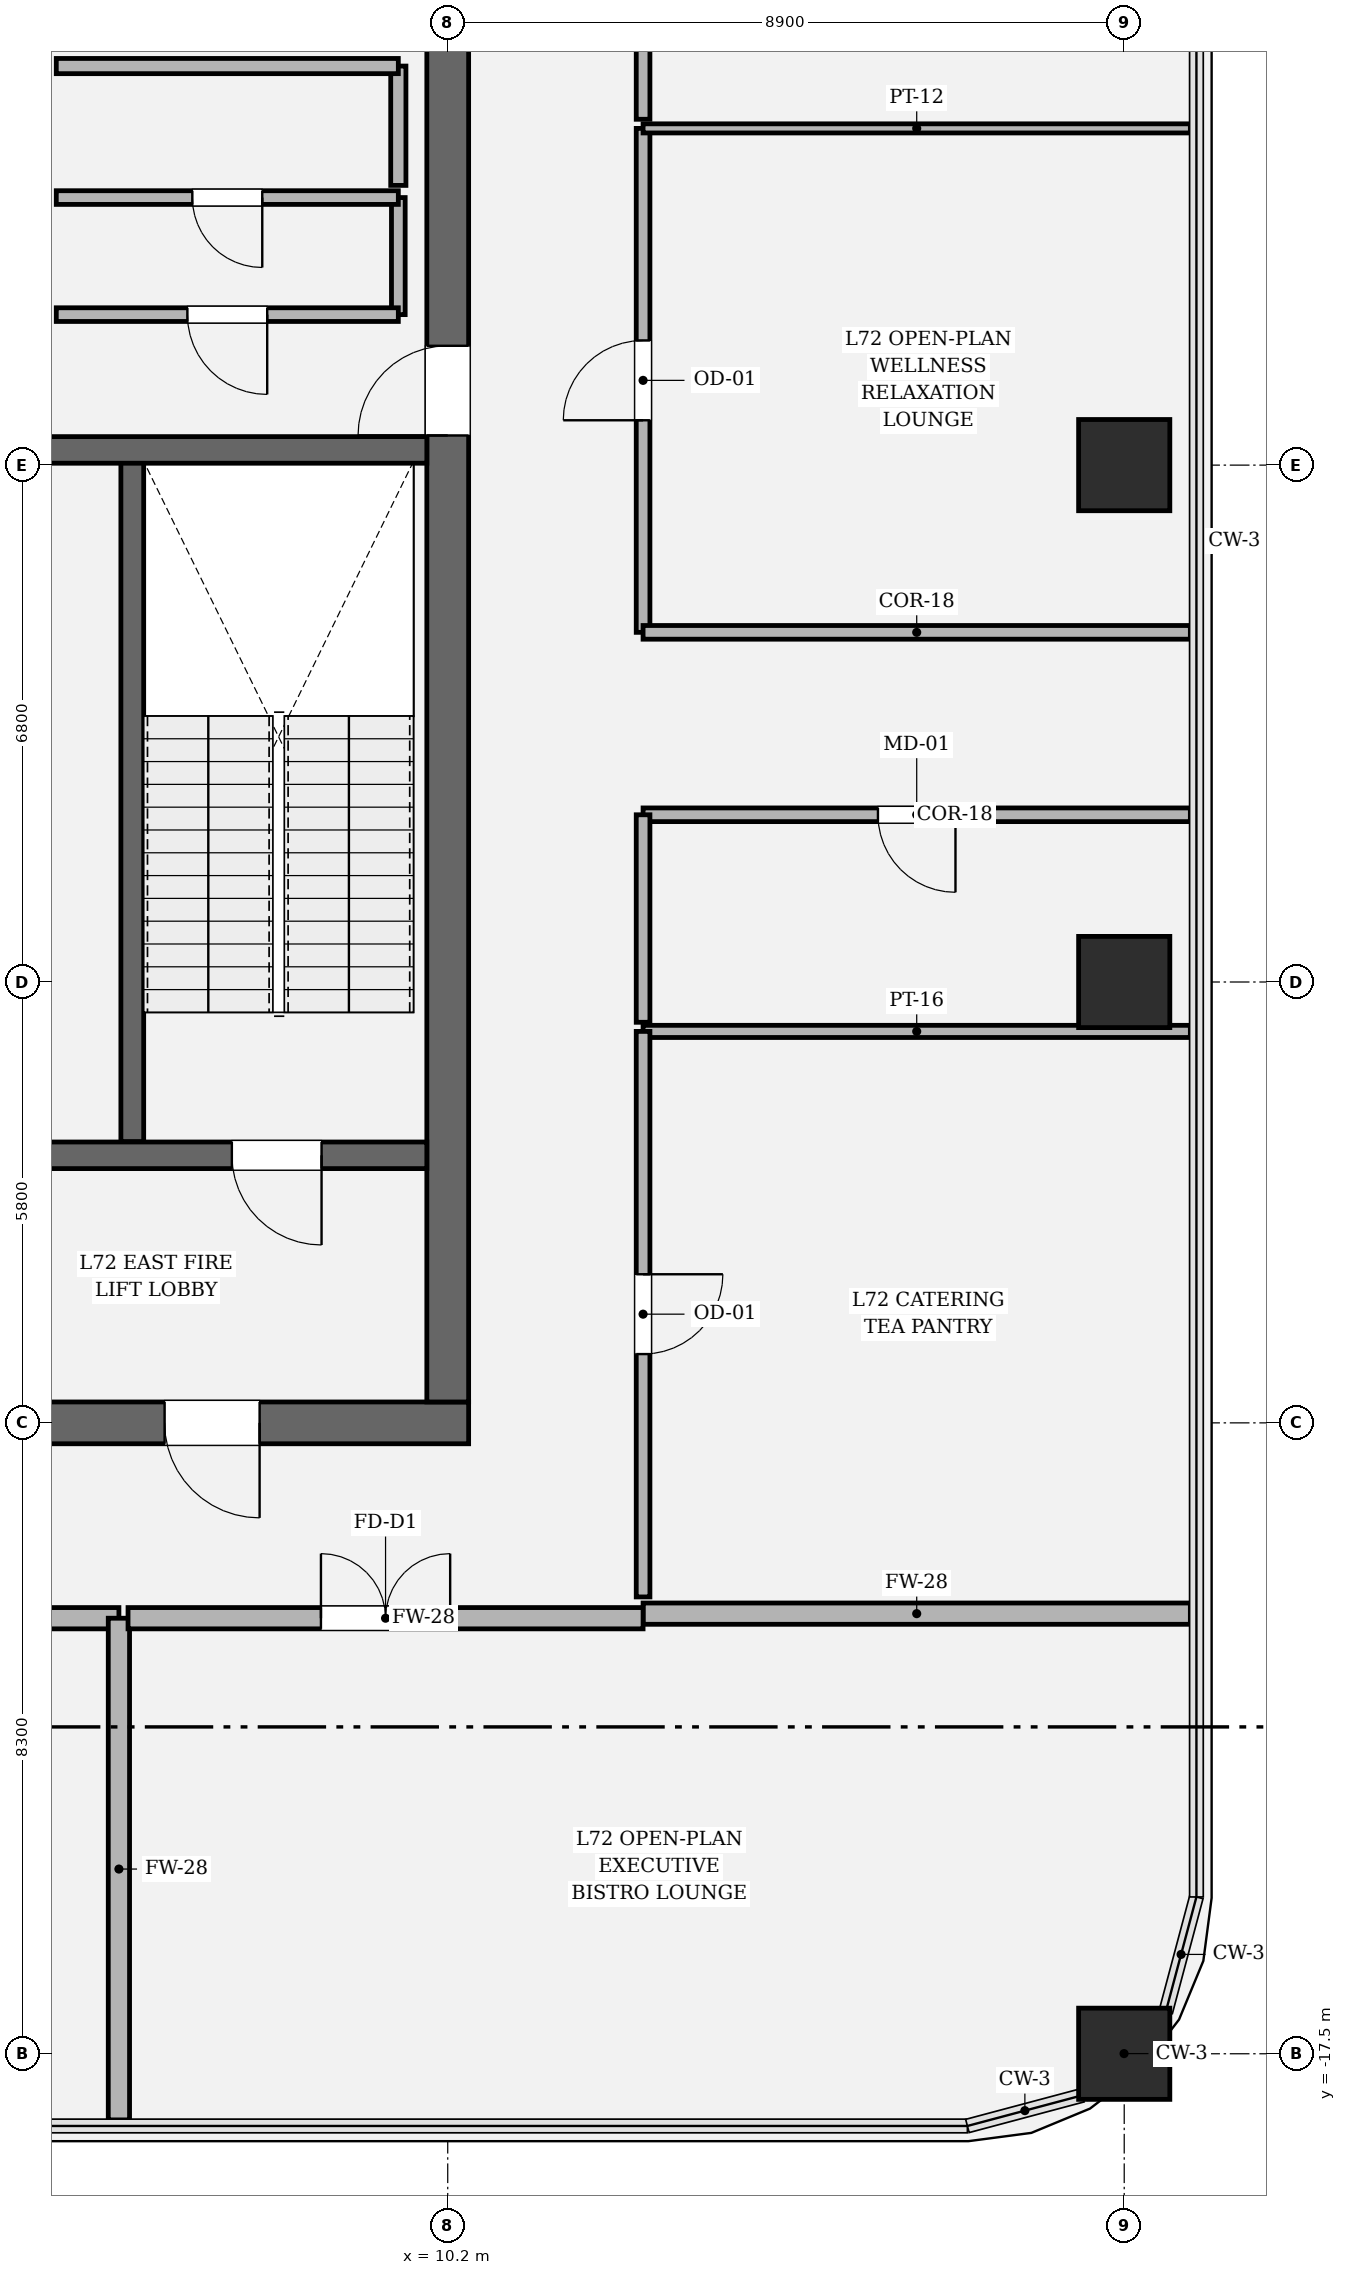
"""IFC4 building model, lengths in metres.
Left out: names, types, materials, properties, quantities, classifications, styles, units other than length and angle.
Written with IfcOpenShell. Run it as: python <this file> out.ifc"""

import sys

from ifc_helpers import new_model, si_unit, direction, frame, frame_2d, origin, origin_2d, place, context, subcontext, project, spatial, rectangle, hollow_rectangle, extrude, element, fill, save


model = new_model("IFC4")
c1 = context("Model", 3, precision=1e-05, world=origin(), true_north=direction((0.0, 1.0)))
c2 = subcontext(c1, "Body", "Model", "MODEL_VIEW")
j1 = project(units=[si_unit("LENGTHUNIT", "METRE"), si_unit("PLANEANGLEUNIT", "RADIAN")], contexts=[c1])
p1 = place(None, origin())
s1 = spatial("IfcSite", under=j1, at=p1, CompositionType="ELEMENT")
p2 = place(p1, origin())
s2 = spatial("IfcBuilding", under=s1, at=p2, CompositionType="ELEMENT")
p3 = place(p2, frame((0.0, 0.0, 304.8)))
s3 = spatial("IfcBuildingStorey", under=s2, at=p3, CompositionType="ELEMENT", Elevation=304.8)
p4 = place(p3, frame((10.475, -9.2, 0.0), z_axis=(0.0, 0.0, 1.0), x_axis=(-1.0, 0.0, 0.0)))
e1 = element("IfcWall", 1, at=p4, inside=s3, PredefinedType="SHEAR", context=c2, shape_type="SweptSolid", body=[
    extrude(rectangle(XDim=20.95, YDim=0.55, at=frame_2d((10.475, 0.0))), origin(), (0.0, 0.0, 1.0), 4.2),
])
p5 = place(p4, frame((2.75, 0.0, 0.0)))
e2 = element("IfcOpeningElement", 2, at=p5, cuts=e1, PredefinedType="OPENING", context=c2, shape_type="SweptSolid", body=[
    extrude(rectangle(XDim=1.25, YDim=2.25, at=frame_2d((0.625, 1.125))), frame((0.0, 0.285, 0.0), z_axis=(0.0, -1.0, 0.0), x_axis=(1.0, 0.0, 0.0)), (0.0, 0.0, 1.0), 0.57),
])
p6 = place(p4, frame((16.95, 0.0, 0.0)))
e3 = element("IfcOpeningElement", 3, at=p6, cuts=e1, PredefinedType="OPENING", context=c2, shape_type="SweptSolid", body=[
    extrude(rectangle(XDim=1.25, YDim=2.25, at=frame_2d((0.625, 1.125))), frame((0.0, 0.285, 0.0), z_axis=(0.0, -1.0, 0.0), x_axis=(1.0, 0.0, 0.0)), (0.0, 0.0, 1.0), 0.57),
])
p7 = place(p3, frame((10.2, 8.925, 0.0), z_axis=(0.0, 0.0, 1.0), x_axis=(0.0, -1.0, 0.0)))
e4 = element("IfcWall", 4, at=p7, inside=s3, PredefinedType="SHEAR", context=c2, shape_type="SweptSolid", body=[
    extrude(rectangle(XDim=17.85, YDim=0.55, at=frame_2d((8.925, 0.0))), origin(), (0.0, 0.0, 1.0), 4.2),
])
p8 = place(p7, frame((3.955, 0.0, 0.0)))
e5 = element("IfcOpeningElement", 5, at=p8, cuts=e4, PredefinedType="OPENING", context=c2, shape_type="SweptSolid", body=[
    extrude(rectangle(XDim=1.18, YDim=2.2, at=frame_2d((0.59, 1.1))), frame((0.0, 0.285, 0.0), z_axis=(0.0, -1.0, 0.0), x_axis=(1.0, 0.0, 0.0)), (0.0, 0.0, 1.0), 0.57),
])
p9 = place(p3, frame((6.05, 3.45, 0.0), z_axis=(0.0, 0.0, 1.0), x_axis=(0.0, -1.0, 0.0)))
e6 = element("IfcWall", 6, at=p9, inside=s3, PredefinedType="SOLIDWALL", context=c2, shape_type="SweptSolid", body=[
    extrude(rectangle(XDim=8.95, YDim=0.3, at=frame_2d((4.475, 0.0))), origin(), (0.0, 0.0, 1.0), 4.2),
])
p10 = place(p3, frame((4.65, -5.68, 0.0), z_axis=(0.0, 0.0, 1.0), x_axis=(1.0, 0.0, 0.0)))
e7 = element("IfcWall", 7, at=p10, inside=s3, PredefinedType="SOLIDWALL", context=c2, shape_type="SweptSolid", body=[
    extrude(rectangle(XDim=5.275, YDim=0.35, at=frame_2d((2.638, 0.0))), origin(), (0.0, 0.0, 1.0), 4.2),
])
p11 = place(p10, frame((2.71, 0.0, 0.0)))
e8 = element("IfcOpeningElement", 8, at=p11, cuts=e7, PredefinedType="OPENING", context=c2, shape_type="SweptSolid", body=[
    extrude(rectangle(XDim=1.18, YDim=2.2, at=frame_2d((0.59, 1.1))), frame((0.0, 0.185, 0.0), z_axis=(0.0, -1.0, 0.0), x_axis=(1.0, 0.0, 0.0)), (0.0, 0.0, 1.0), 0.37),
])
p12 = place(p3, frame((4.65, 3.6, 0.0), z_axis=(0.0, 0.0, 1.0), x_axis=(1.0, 0.0, 0.0)))
e9 = element("IfcWall", 9, at=p12, inside=s3, PredefinedType="SOLIDWALL", context=c2, shape_type="SweptSolid", body=[
    extrude(rectangle(XDim=5.275, YDim=0.35, at=frame_2d((2.638, 0.0))), origin(), (0.0, 0.0, 1.0), 4.2),
])
for number, where, z_axis, x_axis in (
    (10, (19.1, -17.5, 0.0), (0.0, 0.0, 1.0), (1.0, 0.0, 0.0)),
    (11, (19.1, -3.4, 0.0), (0.0, 0.0, 1.0), (1.0, 0.0, 0.0)),
    (12, (19.1, 3.4, 0.0), (0.0, 0.0, 1.0), (1.0, 0.0, 0.0)),
):
    element("IfcColumn", number, at=place(p3, frame(where, z_axis=z_axis, x_axis=x_axis)), inside=s3, PredefinedType="COLUMN", context=c2, shape_type="SweptSolid", body=[
        extrude(hollow_rectangle(XDim=1.2, YDim=1.2, WallThickness=0.035, at=origin_2d()), origin(), (0.0, 0.0, 1.0), 4.2),
    ])
p13 = place(p3, frame((9.55, 5.38, 0.0), z_axis=(0.0, 0.0, 1.0), x_axis=(0.0, 1.0, 0.0)))
e13 = element("IfcWall", 13, at=p13, inside=s3, PredefinedType="PARTITIONING", context=c2, shape_type="SweptSolid", body=[
    extrude(rectangle(XDim=1.54, YDim=0.18, at=frame_2d((0.77, 0.0))), origin(), (0.0, 0.0, 1.0), 4.0),
])
p14 = place(p3, frame((9.55, 6.92, 0.0), z_axis=(0.0, 0.0, 1.0), x_axis=(-1.0, 0.0, 0.0)))
e14 = element("IfcWall", 14, at=p14, inside=s3, PredefinedType="PARTITIONING", context=c2, shape_type="SweptSolid", body=[
    extrude(rectangle(XDim=4.5, YDim=0.18, at=frame_2d((2.25, 0.0))), origin(), (0.0, 0.0, 1.0), 4.0),
])
p15 = place(p14, frame((1.79, 0.0, 0.0)))
e15 = element("IfcOpeningElement", 15, at=p15, cuts=e14, PredefinedType="OPENING", context=c2, shape_type="SweptSolid", body=[
    extrude(rectangle(XDim=0.92, YDim=2.1, at=frame_2d((0.46, 1.05))), frame((0.0, 0.1, 0.0), z_axis=(0.0, -1.0, 0.0), x_axis=(1.0, 0.0, 0.0)), (0.0, 0.0, 1.0), 0.2),
])
p16 = place(p3, frame((5.05, 5.38, 0.0), z_axis=(0.0, 0.0, 1.0), x_axis=(1.0, 0.0, 0.0)))
e16 = element("IfcWall", 16, at=p16, inside=s3, PredefinedType="PARTITIONING", context=c2, shape_type="SweptSolid", body=[
    extrude(rectangle(XDim=4.5, YDim=0.18, at=frame_2d((2.25, 0.0))), origin(), (0.0, 0.0, 1.0), 4.0),
])
p17 = place(p16, frame((1.725, 0.0, 0.0)))
e17 = element("IfcOpeningElement", 17, at=p17, cuts=e16, PredefinedType="OPENING", context=c2, shape_type="SweptSolid", body=[
    extrude(rectangle(XDim=1.05, YDim=2.2, at=frame_2d((0.525, 1.1))), frame((0.0, 0.1, 0.0), z_axis=(0.0, -1.0, 0.0), x_axis=(1.0, 0.0, 0.0)), (0.0, 0.0, 1.0), 0.2),
])
p18 = place(p3, frame((9.55, 7.08, 0.0), z_axis=(0.0, 0.0, 1.0), x_axis=(0.0, 1.0, 0.0)))
e18 = element("IfcWall", 18, at=p18, inside=s3, PredefinedType="SOLIDWALL", context=c2, shape_type="SweptSolid", body=[
    extrude(rectangle(XDim=1.57, YDim=0.2, at=frame_2d((0.785, 0.0))), origin(), (0.0, 0.0, 1.0), 4.0),
])
p19 = place(p3, frame((9.55, 8.65, 0.0), z_axis=(0.0, 0.0, 1.0), x_axis=(-1.0, 0.0, 0.0)))
e19 = element("IfcWall", 19, at=p19, inside=s3, PredefinedType="SOLIDWALL", context=c2, shape_type="SweptSolid", body=[
    extrude(rectangle(XDim=4.5, YDim=0.2, at=frame_2d((2.25, 0.0))), origin(), (0.0, 0.0, 1.0), 4.0),
])
p20 = place(p3, frame((-16.27, -11.77, 0.0), z_axis=(0.0, 0.0, 1.0), x_axis=(1.0, 0.0, 0.0)))
e20 = element("IfcWall", 20, at=p20, inside=s3, PredefinedType="SOLIDWALL", context=c2, shape_type="SweptSolid", body=[
    extrude(rectangle(XDim=22.144, YDim=0.28, at=frame_2d((11.072, 0.0))), origin(), (0.0, 0.0, 1.0), 3.394),
])
p21 = place(p20, frame((10.222, 0.0, 0.0)))
e21 = element("IfcOpeningElement", 21, at=p21, cuts=e20, PredefinedType="OPENING", context=c2, shape_type="SweptSolid", body=[
    extrude(rectangle(XDim=1.7, YDim=2.3, at=frame_2d((0.85, 1.15))), frame((0.0, 0.15, 0.0), z_axis=(0.0, -1.0, 0.0), x_axis=(1.0, 0.0, 0.0)), (0.0, 0.0, 1.0), 0.3),
])
p22 = place(p3, frame((5.874, -11.77, 0.0), z_axis=(0.0, 0.0, 1.0), x_axis=(0.0, -1.0, 0.0)))
e22 = element("IfcWall", 22, at=p22, inside=s3, PredefinedType="SOLIDWALL", context=c2, shape_type="SweptSolid", body=[
    extrude(rectangle(XDim=6.6, YDim=0.28, at=frame_2d((3.3, 0.0))), origin(), (0.0, 0.0, 1.0), 3.394),
])
p23 = place(p3, frame((12.77, -11.71, 0.0), z_axis=(0.0, 0.0, 1.0), x_axis=(1.0, 0.0, 0.0)))
e23 = element("IfcWall", 23, at=p23, inside=s3, PredefinedType="SOLIDWALL", context=c2, shape_type="SweptSolid", body=[
    extrude(rectangle(XDim=7.2, YDim=0.28, at=frame_2d((3.6, 0.0))), origin(), (0.0, 0.0, 1.0), 3.394),
])
p24 = place(p3, frame((5.994, -11.77, 0.0), z_axis=(0.0, 0.0, 1.0), x_axis=(1.0, 0.0, 0.0)))
e24 = element("IfcWall", 24, at=p24, inside=s3, PredefinedType="SOLIDWALL", context=c2, shape_type="SweptSolid", body=[
    extrude(rectangle(XDim=6.776, YDim=0.28, at=frame_2d((3.388, 0.0))), origin(), (0.0, 0.0, 1.0), 3.394),
])
p25 = place(p24, frame((2.538, 0.0, 0.0)))
e25 = element("IfcOpeningElement", 25, at=p25, cuts=e24, PredefinedType="OPENING", context=c2, shape_type="SweptSolid", body=[
    extrude(rectangle(XDim=1.7, YDim=2.3, at=frame_2d((0.85, 1.15))), frame((0.0, 0.15, 0.0), z_axis=(0.0, -1.0, 0.0), x_axis=(1.0, 0.0, 0.0)), (0.0, 0.0, 1.0), 0.3),
])
p26 = place(p3, frame((12.77, -4.05, 0.0), z_axis=(0.0, 0.0, 1.0), x_axis=(1.0, 0.0, 0.0)))
e26 = element("IfcWall", 26, at=p26, inside=s3, PredefinedType="PARTITIONING", context=c2, shape_type="SweptSolid", body=[
    extrude(rectangle(XDim=7.2, YDim=0.16, at=frame_2d((3.6, 0.0))), origin(), (0.0, 0.0, 1.0), 3.394),
])
p27 = place(p3, frame((12.77, -11.49, 0.0), z_axis=(0.0, 0.0, 1.0), x_axis=(0.0, 1.0, 0.0)))
e27 = element("IfcWall", 27, at=p27, inside=s3, PredefinedType="PARTITIONING", context=c2, shape_type="SweptSolid", body=[
    extrude(rectangle(XDim=7.44, YDim=0.18, at=frame_2d((3.72, 0.0))), origin(), (0.0, 0.0, 1.0), 3.394),
])
p28 = place(p27, frame((3.195, 0.0, 0.0)))
e28 = element("IfcOpeningElement", 28, at=p28, cuts=e27, PredefinedType="OPENING", context=c2, shape_type="SweptSolid", body=[
    extrude(rectangle(XDim=1.05, YDim=2.2, at=frame_2d((0.525, 1.1))), frame((0.0, 0.1, 0.0), z_axis=(0.0, -1.0, 0.0), x_axis=(1.0, 0.0, 0.0)), (0.0, 0.0, 1.0), 0.2),
])
p29 = place(p3, frame((12.77, -1.2, 0.0), z_axis=(0.0, 0.0, 1.0), x_axis=(1.0, 0.0, 0.0)))
e29 = element("IfcWall", 29, at=p29, inside=s3, PredefinedType="PARTITIONING", context=c2, shape_type="SweptSolid", body=[
    extrude(rectangle(XDim=7.2, YDim=0.18, at=frame_2d((3.6, 0.0))), origin(), (0.0, 0.0, 1.0), 3.394),
])
p30 = place(p29, frame((3.09, 0.0, 0.0)))
e30 = element("IfcOpeningElement", 30, at=p30, cuts=e29, PredefinedType="OPENING", context=c2, shape_type="SweptSolid", body=[
    extrude(rectangle(XDim=1.02, YDim=2.2, at=frame_2d((0.51, 1.1))), frame((0.0, 0.1, 0.0), z_axis=(0.0, -1.0, 0.0), x_axis=(1.0, 0.0, 0.0)), (0.0, 0.0, 1.0), 0.2),
])
p31 = place(p3, frame((12.77, -3.93, 0.0), z_axis=(0.0, 0.0, 1.0), x_axis=(0.0, 1.0, 0.0)))
e31 = element("IfcWall", 31, at=p31, inside=s3, PredefinedType="PARTITIONING", context=c2, shape_type="SweptSolid", body=[
    extrude(rectangle(XDim=2.73, YDim=0.18, at=frame_2d((1.365, 0.0))), origin(), (0.0, 0.0, 1.0), 3.394),
])
p32 = place(p3, frame((12.77, 1.2, 0.0), z_axis=(0.0, 0.0, 1.0), x_axis=(0.0, 1.0, 0.0)))
e32 = element("IfcWall", 32, at=p32, inside=s3, PredefinedType="PARTITIONING", context=c2, shape_type="SweptSolid", body=[
    extrude(rectangle(XDim=6.63, YDim=0.18, at=frame_2d((3.315, 0.0))), origin(), (0.0, 0.0, 1.0), 3.394),
])
p33 = place(p32, frame((2.79, 0.0, 0.0)))
e33 = element("IfcOpeningElement", 33, at=p33, cuts=e32, PredefinedType="OPENING", context=c2, shape_type="SweptSolid", body=[
    extrude(rectangle(XDim=1.05, YDim=2.2, at=frame_2d((0.525, 1.1))), frame((0.0, 0.1, 0.0), z_axis=(0.0, -1.0, 0.0), x_axis=(1.0, 0.0, 0.0)), (0.0, 0.0, 1.0), 0.2),
])
p34 = place(p3, frame((12.77, 7.83, 0.0), z_axis=(0.0, 0.0, 1.0), x_axis=(1.0, 0.0, 0.0)))
e34 = element("IfcWall", 34, at=p34, inside=s3, PredefinedType="PARTITIONING", context=c2, shape_type="SweptSolid", body=[
    extrude(rectangle(XDim=7.2, YDim=0.12, at=frame_2d((3.6, 0.0))), origin(), (0.0, 0.0, 1.0), 3.394),
])
p35 = place(p3, frame((19.97, 1.2, 0.0), z_axis=(0.0, 0.0, 1.0), x_axis=(-1.0, 0.0, 0.0)))
e35 = element("IfcWall", 35, at=p35, inside=s3, PredefinedType="PARTITIONING", context=c2, shape_type="SweptSolid", body=[
    extrude(rectangle(XDim=7.2, YDim=0.18, at=frame_2d((3.6, 0.0))), origin(), (0.0, 0.0, 1.0), 3.394),
])
p36 = place(p3, frame((12.77, 7.95, 0.0), z_axis=(0.0, 0.0, 1.0), x_axis=(0.0, 1.0, 0.0)))
e36 = element("IfcWall", 36, at=p36, inside=s3, PredefinedType="PARTITIONING", context=c2, shape_type="SweptSolid", body=[
    extrude(rectangle(XDim=3.82, YDim=0.18, at=frame_2d((1.91, 0.0))), origin(), (0.0, 0.0, 1.0), 3.394),
])
p37 = place(p36, frame((1.385, 0.0, 0.0)))
e37 = element("IfcOpeningElement", 37, at=p37, cuts=e36, PredefinedType="OPENING", context=c2, shape_type="SweptSolid", body=[
    extrude(rectangle(XDim=1.05, YDim=2.2, at=frame_2d((0.525, 1.1))), frame((0.0, 0.1, 0.0), z_axis=(0.0, -1.0, 0.0), x_axis=(1.0, 0.0, 0.0)), (0.0, 0.0, 1.0), 0.2),
])
p38 = place(p11, origin())
e38 = element("IfcDoor", 38, at=p38, inside=s3, OperationType="SINGLE_SWING_RIGHT", PredefinedType="DOOR", context=c2, shape_type="SweptSolid", body=[
    extrude(rectangle(XDim=1.18, YDim=2.2, at=frame_2d((0.59, 1.1))), frame((0.0, 0.025, 0.0), z_axis=(0.0, -1.0, 0.0), x_axis=(1.0, 0.0, 0.0)), (0.0, 0.0, 1.0), 0.05),
])
fill(e8, e38)
p39 = place(p5, origin())
e39 = element("IfcDoor", 39, at=p39, inside=s3, OperationType="SINGLE_SWING_LEFT", PredefinedType="DOOR", context=c2, shape_type="SweptSolid", body=[
    extrude(rectangle(XDim=1.25, YDim=2.25, at=frame_2d((0.625, 1.125))), frame((0.0, 0.025, 0.0), z_axis=(0.0, -1.0, 0.0), x_axis=(1.0, 0.0, 0.0)), (0.0, 0.0, 1.0), 0.05),
])
fill(e2, e39)
p40 = place(p8, origin())
e40 = element("IfcDoor", 40, at=p40, inside=s3, OperationType="SINGLE_SWING_RIGHT", PredefinedType="DOOR", context=c2, shape_type="SweptSolid", body=[
    extrude(rectangle(XDim=1.18, YDim=2.2, at=frame_2d((0.59, 1.1))), frame((0.0, 0.025, 0.0), z_axis=(0.0, -1.0, 0.0), x_axis=(1.0, 0.0, 0.0)), (0.0, 0.0, 1.0), 0.05),
])
fill(e5, e40)
p41 = place(p17, origin())
e41 = element("IfcDoor", 41, at=p41, inside=s3, OperationType="SINGLE_SWING_RIGHT", PredefinedType="DOOR", context=c2, shape_type="SweptSolid", body=[
    extrude(rectangle(XDim=1.05, YDim=2.2, at=frame_2d((0.525, 1.1))), frame((0.0, 0.025, 0.0), z_axis=(0.0, -1.0, 0.0), x_axis=(1.0, 0.0, 0.0)), (0.0, 0.0, 1.0), 0.05),
])
fill(e17, e41)
p42 = place(p15, origin())
e42 = element("IfcDoor", 42, at=p42, inside=s3, OperationType="SINGLE_SWING_LEFT", PredefinedType="DOOR", context=c2, shape_type="SweptSolid", body=[
    extrude(rectangle(XDim=0.92, YDim=2.1, at=frame_2d((0.46, 1.05))), frame((0.0, 0.025, 0.0), z_axis=(0.0, -1.0, 0.0), x_axis=(1.0, 0.0, 0.0)), (0.0, 0.0, 1.0), 0.05),
])
fill(e15, e42)
p43 = place(p25, origin())
e43 = element("IfcDoor", 43, at=p43, inside=s3, OperationType="DOUBLE_DOOR_SINGLE_SWING", PredefinedType="DOOR", context=c2, shape_type="SweptSolid", body=[
    extrude(rectangle(XDim=1.7, YDim=2.3, at=frame_2d((0.85, 1.15))), frame((0.0, 0.025, 0.0), z_axis=(0.0, -1.0, 0.0), x_axis=(1.0, 0.0, 0.0)), (0.0, 0.0, 1.0), 0.05),
])
fill(e25, e43)
p44 = place(p28, origin())
e44 = element("IfcDoor", 44, at=p44, inside=s3, OperationType="SINGLE_SWING_RIGHT", PredefinedType="DOOR", context=c2, shape_type="SweptSolid", body=[
    extrude(rectangle(XDim=1.05, YDim=2.2, at=frame_2d((0.525, 1.1))), frame((0.0, 0.025, 0.0), z_axis=(0.0, -1.0, 0.0), x_axis=(1.0, 0.0, 0.0)), (0.0, 0.0, 1.0), 0.05),
])
fill(e28, e44)
p45 = place(p30, origin())
e45 = element("IfcDoor", 45, at=p45, inside=s3, OperationType="SINGLE_SWING_RIGHT", PredefinedType="DOOR", context=c2, shape_type="SweptSolid", body=[
    extrude(rectangle(XDim=1.02, YDim=2.2, at=frame_2d((0.51, 1.1))), frame((0.0, 0.025, 0.0), z_axis=(0.0, -1.0, 0.0), x_axis=(1.0, 0.0, 0.0)), (0.0, 0.0, 1.0), 0.05),
])
fill(e30, e45)
p46 = place(p33, origin())
e46 = element("IfcDoor", 46, at=p46, inside=s3, OperationType="SINGLE_SWING_LEFT", PredefinedType="DOOR", context=c2, shape_type="SweptSolid", body=[
    extrude(rectangle(XDim=1.05, YDim=2.2, at=frame_2d((0.525, 1.1))), frame((0.0, 0.025, 0.0), z_axis=(0.0, -1.0, 0.0), x_axis=(1.0, 0.0, 0.0)), (0.0, 0.0, 1.0), 0.05),
])
fill(e33, e46)
save(model, sys.argv[1])
